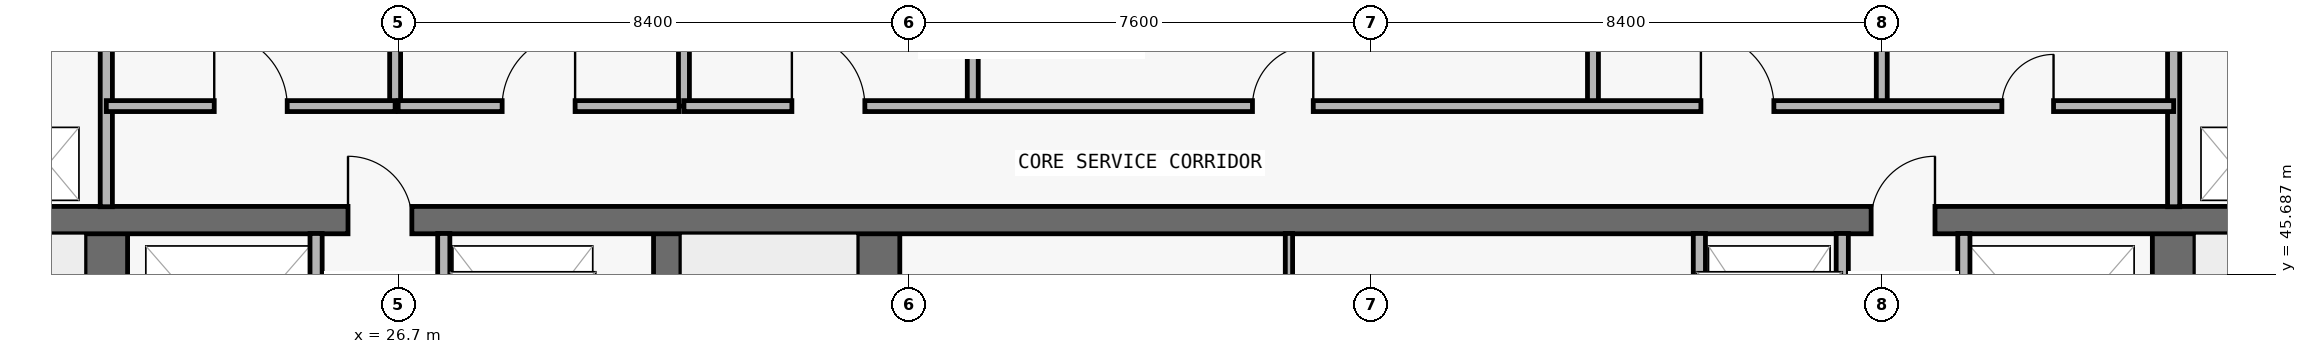
"""IFC4 building model, lengths in metres.
Left out: names, types, materials, properties, quantities, classifications, styles, units other than length and angle.
Written with IfcOpenShell. Run it as: python <this file> out.ifc"""

import sys

from ifc_helpers import new_model, si_unit, direction, frame, frame_2d, origin, place, context, subcontext, project, spatial, rectangle, extrude, element, fill, save


model = new_model("IFC4")
c1 = context("Model", 3, precision=1e-05, world=origin(), true_north=direction((0.0, 1.0)))
c2 = subcontext(c1, "Body", "Model", "MODEL_VIEW")
j1 = project(units=[si_unit("LENGTHUNIT", "METRE"), si_unit("PLANEANGLEUNIT", "RADIAN")], contexts=[c1])
p1 = place(None, origin())
s1 = spatial("IfcSite", under=j1, at=p1, CompositionType="ELEMENT")
p2 = place(p1, origin())
s2 = spatial("IfcBuilding", under=s1, at=p2, CompositionType="ELEMENT")
p3 = place(p2, frame((0.0, 0.0, 233.1)))
s3 = spatial("IfcBuildingStorey", under=s2, at=p3, CompositionType="ELEMENT", Elevation=233.1)
p4 = place(p3, frame((21.9, 37.0, 0.0), z_axis=(0.0, 0.0, 1.0), x_axis=(0.0, 1.0, 0.0)))
e1 = element("IfcWall", 1, at=p4, inside=s3, PredefinedType="SHEAR", context=c2, shape_type="SweptSolid", body=[
    extrude(rectangle(XDim=9.575, YDim=0.7, at=frame_2d((4.788, 0.0))), origin(), (0.0, 0.0, 1.0), 3.05),
])
p5 = place(p4, frame((0.55, 0.0, 0.0)))
e2 = element("IfcOpeningElement", 2, at=p5, cuts=e1, PredefinedType="OPENING", context=c2, shape_type="SweptSolid", body=[
    extrude(rectangle(XDim=1.1, YDim=2.15, at=frame_2d((0.55, 1.075))), frame((0.0, 0.36, 0.0), z_axis=(0.0, -1.0, 0.0), x_axis=(1.0, 0.0, 0.0)), (0.0, 0.0, 1.0), 0.72),
])
p6 = place(p3, frame((55.9, 37.0, 0.0), z_axis=(0.0, 0.0, 1.0), x_axis=(0.0, 1.0, 0.0)))
e3 = element("IfcWall", 3, at=p6, inside=s3, PredefinedType="SHEAR", context=c2, shape_type="SweptSolid", body=[
    extrude(rectangle(XDim=9.575, YDim=0.7, at=frame_2d((4.788, 0.0))), origin(), (0.0, 0.0, 1.0), 3.05),
])
p7 = place(p6, frame((0.55, 0.0, 0.0)))
e4 = element("IfcOpeningElement", 4, at=p7, cuts=e3, PredefinedType="OPENING", context=c2, shape_type="SweptSolid", body=[
    extrude(rectangle(XDim=1.1, YDim=2.15, at=frame_2d((0.55, 1.075))), frame((0.0, 0.36, 0.0), z_axis=(0.0, -1.0, 0.0), x_axis=(1.0, 0.0, 0.0)), (0.0, 0.0, 1.0), 0.72),
])
p8 = place(p3, frame((31.125, 37.0, 0.0), z_axis=(0.0, 0.0, 1.0), x_axis=(0.0, 1.0, 0.0)))
e5 = element("IfcWall", 5, at=p8, inside=s3, PredefinedType="SHEAR", context=c2, shape_type="SweptSolid", body=[
    extrude(rectangle(XDim=9.575, YDim=0.45, at=frame_2d((4.788, 0.0))), origin(), (0.0, 0.0, 1.0), 3.05),
])
p9 = place(p3, frame((34.6, 37.0, 0.0), z_axis=(0.0, 0.0, 1.0), x_axis=(0.0, 1.0, 0.0)))
e6 = element("IfcWall", 6, at=p9, inside=s3, PredefinedType="SHEAR", context=c2, shape_type="SweptSolid", body=[
    extrude(rectangle(XDim=9.575, YDim=0.7, at=frame_2d((4.788, 0.0))), origin(), (0.0, 0.0, 1.0), 3.05),
])
p10 = place(p3, frame((18.3, 46.575, 0.0), z_axis=(0.0, 0.0, 1.0), x_axis=(1.0, 0.0, 0.0)))
e7 = element("IfcWall", 7, at=p10, inside=s3, PredefinedType="SHEAR", context=c2, shape_type="SweptSolid", body=[
    extrude(rectangle(XDim=41.2, YDim=0.45, at=frame_2d((20.6, 0.0))), origin(), (0.0, 0.0, 1.0), 3.05),
])
p11 = place(p10, frame((7.575, 0.0, 0.0)))
e8 = element("IfcOpeningElement", 8, at=p11, cuts=e7, PredefinedType="OPENING", context=c2, shape_type="SweptSolid", body=[
    extrude(rectangle(XDim=1.05, YDim=2.15, at=frame_2d((0.525, 1.075))), frame((0.0, 0.235, 0.0), z_axis=(0.0, -1.0, 0.0), x_axis=(1.0, 0.0, 0.0)), (0.0, 0.0, 1.0), 0.47),
])
p12 = place(p10, frame((32.625, 0.0, 0.0)))
e9 = element("IfcOpeningElement", 9, at=p12, cuts=e7, PredefinedType="OPENING", context=c2, shape_type="SweptSolid", body=[
    extrude(rectangle(XDim=1.05, YDim=2.15, at=frame_2d((0.525, 1.075))), frame((0.0, 0.235, 0.0), z_axis=(0.0, -1.0, 0.0), x_axis=(1.0, 0.0, 0.0)), (0.0, 0.0, 1.0), 0.47),
])
p13 = place(p3, frame((21.9, 46.795, 0.0), z_axis=(0.0, 0.0, 1.0), x_axis=(0.0, 1.0, 0.0)))
e10 = element("IfcWall", 10, at=p13, inside=s3, PredefinedType="PARTITIONING", context=c2, shape_type="SweptSolid", body=[
    extrude(rectangle(XDim=3.16, YDim=0.2, at=frame_2d((1.58, 0.0))), origin(), (0.0, 0.0, 1.0), 3.05),
])
p14 = place(p3, frame((25.35, 43.17, 0.0), z_axis=(0.0, 0.0, 1.0), x_axis=(0.0, 1.0, 0.0)))
e11 = element("IfcWall", 11, at=p14, inside=s3, PredefinedType="PARTITIONING", context=c2, shape_type="SweptSolid", body=[
    extrude(rectangle(XDim=3.185, YDim=0.2, at=frame_2d((1.593, 0.0))), origin(), (0.0, 0.0, 1.0), 3.05),
])
p15 = place(p3, frame((26.65, 48.45, 0.0), z_axis=(0.0, 0.0, 1.0), x_axis=(0.0, 1.0, 0.0)))
e12 = element("IfcWall", 12, at=p15, inside=s3, PredefinedType="PARTITIONING", context=c2, shape_type="SweptSolid", body=[
    extrude(rectangle(XDim=1.505, YDim=0.18, at=frame_2d((0.752, 0.0))), origin(), (0.0, 0.0, 1.0), 3.05),
])
p16 = place(p3, frame((27.45, 43.17, 0.0), z_axis=(0.0, 0.0, 1.0), x_axis=(0.0, 1.0, 0.0)))
e13 = element("IfcWall", 13, at=p16, inside=s3, PredefinedType="PARTITIONING", context=c2, shape_type="SweptSolid", body=[
    extrude(rectangle(XDim=3.185, YDim=0.2, at=frame_2d((1.593, 0.0))), origin(), (0.0, 0.0, 1.0), 3.05),
])
for number, where, z_axis, x_axis in (
    (14, (31.4, 48.45, 0.0), (0.0, 0.0, 1.0), (0.0, 1.0, 0.0)),
    (15, (36.15, 48.45, 0.0), (0.0, 0.0, 1.0), (0.0, 1.0, 0.0)),
):
    element("IfcWall", number, at=place(p3, frame(where, z_axis=z_axis, x_axis=x_axis)), inside=s3, PredefinedType="PARTITIONING", context=c2, shape_type="SweptSolid", body=[
        extrude(rectangle(XDim=1.505, YDim=0.18, at=frame_2d((0.752, 0.0))), origin(), (0.0, 0.0, 1.0), 3.05),
    ])
p17 = place(p3, frame((41.35, 43.17, 0.0), z_axis=(0.0, 0.0, 1.0), x_axis=(0.0, 1.0, 0.0)))
e16 = element("IfcWall", 16, at=p17, inside=s3, PredefinedType="PARTITIONING", context=c2, shape_type="SweptSolid", body=[
    extrude(rectangle(XDim=3.185, YDim=0.12, at=frame_2d((1.593, 0.0))), origin(), (0.0, 0.0, 1.0), 3.05),
])
p18 = place(p3, frame((46.35, 48.45, 0.0), z_axis=(0.0, 0.0, 1.0), x_axis=(0.0, 1.0, 0.0)))
e17 = element("IfcWall", 17, at=p18, inside=s3, PredefinedType="PARTITIONING", context=c2, shape_type="SweptSolid", body=[
    extrude(rectangle(XDim=1.505, YDim=0.18, at=frame_2d((0.752, 0.0))), origin(), (0.0, 0.0, 1.0), 3.05),
])
for number, where, z_axis, x_axis in (
    (18, (48.1, 43.17, 0.0), (0.0, 0.0, 1.0), (0.0, 1.0, 0.0)),
    (19, (50.45, 43.17, 0.0), (0.0, 0.0, 1.0), (0.0, 1.0, 0.0)),
):
    element("IfcWall", number, at=place(p3, frame(where, z_axis=z_axis, x_axis=x_axis)), inside=s3, PredefinedType="PARTITIONING", context=c2, shape_type="SweptSolid", body=[
        extrude(rectangle(XDim=3.185, YDim=0.2, at=frame_2d((1.593, 0.0))), origin(), (0.0, 0.0, 1.0), 3.05),
    ])
p19 = place(p3, frame((51.1, 48.45, 0.0), z_axis=(0.0, 0.0, 1.0), x_axis=(0.0, 1.0, 0.0)))
e20 = element("IfcWall", 20, at=p19, inside=s3, PredefinedType="PARTITIONING", context=c2, shape_type="SweptSolid", body=[
    extrude(rectangle(XDim=1.505, YDim=0.18, at=frame_2d((0.752, 0.0))), origin(), (0.0, 0.0, 1.0), 3.05),
])
p20 = place(p3, frame((52.45, 43.17, 0.0), z_axis=(0.0, 0.0, 1.0), x_axis=(0.0, 1.0, 0.0)))
e21 = element("IfcWall", 21, at=p20, inside=s3, PredefinedType="PARTITIONING", context=c2, shape_type="SweptSolid", body=[
    extrude(rectangle(XDim=3.185, YDim=0.2, at=frame_2d((1.593, 0.0))), origin(), (0.0, 0.0, 1.0), 3.05),
])
p21 = place(p3, frame((55.9, 46.795, 0.0), z_axis=(0.0, 0.0, 1.0), x_axis=(0.0, 1.0, 0.0)))
e22 = element("IfcWall", 22, at=p21, inside=s3, PredefinedType="PARTITIONING", context=c2, shape_type="SweptSolid", body=[
    extrude(rectangle(XDim=3.16, YDim=0.2, at=frame_2d((1.58, 0.0))), origin(), (0.0, 0.0, 1.0), 3.05),
])
p22 = place(p3, frame((21.9, 48.45, 0.0), z_axis=(0.0, 0.0, 1.0), x_axis=(1.0, 0.0, 0.0)))
e23 = element("IfcWall", 23, at=p22, inside=s3, PredefinedType="PARTITIONING", context=c2, shape_type="SweptSolid", body=[
    extrude(rectangle(XDim=4.75, YDim=0.18, at=frame_2d((2.375, 0.0))), origin(), (0.0, 0.0, 1.0), 3.05),
])
p23 = place(p22, frame((1.775, 0.0, 0.0)))
e24 = element("IfcOpeningElement", 24, at=p23, cuts=e23, PredefinedType="OPENING", context=c2, shape_type="SweptSolid", body=[
    extrude(rectangle(XDim=1.2, YDim=2.2, at=frame_2d((0.6, 1.1))), frame((0.0, 0.1, 0.0), z_axis=(0.0, -1.0, 0.0), x_axis=(1.0, 0.0, 0.0)), (0.0, 0.0, 1.0), 0.2),
])
p24 = place(p3, frame((26.7, 48.45, 0.0), z_axis=(0.0, 0.0, 1.0), x_axis=(1.0, 0.0, 0.0)))
e25 = element("IfcWall", 25, at=p24, inside=s3, PredefinedType="PARTITIONING", context=c2, shape_type="SweptSolid", body=[
    extrude(rectangle(XDim=4.62, YDim=0.18, at=frame_2d((2.31, 0.0))), origin(), (0.0, 0.0, 1.0), 3.05),
])
p25 = place(p24, frame((1.71, 0.0, 0.0)))
e26 = element("IfcOpeningElement", 26, at=p25, cuts=e25, PredefinedType="OPENING", context=c2, shape_type="SweptSolid", body=[
    extrude(rectangle(XDim=1.2, YDim=2.2, at=frame_2d((0.6, 1.1))), frame((0.0, 0.1, 0.0), z_axis=(0.0, -1.0, 0.0), x_axis=(1.0, 0.0, 0.0)), (0.0, 0.0, 1.0), 0.2),
])
p26 = place(p3, frame((31.4, 48.45, 0.0), z_axis=(0.0, 0.0, 1.0), x_axis=(1.0, 0.0, 0.0)))
e27 = element("IfcWall", 27, at=p26, inside=s3, PredefinedType="PARTITIONING", context=c2, shape_type="SweptSolid", body=[
    extrude(rectangle(XDim=24.5, YDim=0.18, at=frame_2d((12.25, 0.0))), origin(), (0.0, 0.0, 1.0), 3.05),
])
p27 = place(p26, frame((1.775, 0.0, 0.0)))
e28 = element("IfcOpeningElement", 28, at=p27, cuts=e27, PredefinedType="OPENING", context=c2, shape_type="SweptSolid", body=[
    extrude(rectangle(XDim=1.2, YDim=2.2, at=frame_2d((0.6, 1.1))), frame((0.0, 0.1, 0.0), z_axis=(0.0, -1.0, 0.0), x_axis=(1.0, 0.0, 0.0)), (0.0, 0.0, 1.0), 0.2),
])
p28 = place(p26, frame((9.35, 0.0, 0.0)))
e29 = element("IfcOpeningElement", 29, at=p28, cuts=e27, PredefinedType="OPENING", context=c2, shape_type="SweptSolid", body=[
    extrude(rectangle(XDim=1.0, YDim=2.2, at=frame_2d((0.5, 1.1))), frame((0.0, 0.1, 0.0), z_axis=(0.0, -1.0, 0.0), x_axis=(1.0, 0.0, 0.0)), (0.0, 0.0, 1.0), 0.2),
])
p29 = place(p26, frame((16.725, 0.0, 0.0)))
e30 = element("IfcOpeningElement", 30, at=p29, cuts=e27, PredefinedType="OPENING", context=c2, shape_type="SweptSolid", body=[
    extrude(rectangle(XDim=1.2, YDim=2.2, at=frame_2d((0.6, 1.1))), frame((0.0, 0.1, 0.0), z_axis=(0.0, -1.0, 0.0), x_axis=(1.0, 0.0, 0.0)), (0.0, 0.0, 1.0), 0.2),
])
p30 = place(p26, frame((21.675, 0.0, 0.0)))
e31 = element("IfcOpeningElement", 31, at=p30, cuts=e27, PredefinedType="OPENING", context=c2, shape_type="SweptSolid", body=[
    extrude(rectangle(XDim=0.85, YDim=2.1, at=frame_2d((0.425, 1.05))), frame((0.0, 0.1, 0.0), z_axis=(0.0, -1.0, 0.0), x_axis=(1.0, 0.0, 0.0)), (0.0, 0.0, 1.0), 0.2),
])
p31 = place(p11, origin())
e32 = element("IfcDoor", 32, at=p31, inside=s3, OperationType="SINGLE_SWING_LEFT", PredefinedType="DOOR", context=c2, shape_type="SweptSolid", body=[
    extrude(rectangle(XDim=1.05, YDim=2.15, at=frame_2d((0.525, 1.075))), frame((0.0, 0.025, 0.0), z_axis=(0.0, -1.0, 0.0), x_axis=(1.0, 0.0, 0.0)), (0.0, 0.0, 1.0), 0.05),
])
fill(e8, e32)
p32 = place(p12, origin())
e33 = element("IfcDoor", 33, at=p32, inside=s3, OperationType="SINGLE_SWING_RIGHT", PredefinedType="DOOR", context=c2, shape_type="SweptSolid", body=[
    extrude(rectangle(XDim=1.05, YDim=2.15, at=frame_2d((0.525, 1.075))), frame((0.0, 0.025, 0.0), z_axis=(0.0, -1.0, 0.0), x_axis=(1.0, 0.0, 0.0)), (0.0, 0.0, 1.0), 0.05),
])
fill(e9, e33)
p33 = place(p23, origin())
e34 = element("IfcDoor", 34, at=p33, inside=s3, OperationType="SINGLE_SWING_LEFT", PredefinedType="DOOR", context=c2, shape_type="SweptSolid", body=[
    extrude(rectangle(XDim=1.2, YDim=2.2, at=frame_2d((0.6, 1.1))), frame((0.0, 0.025, 0.0), z_axis=(0.0, -1.0, 0.0), x_axis=(1.0, 0.0, 0.0)), (0.0, 0.0, 1.0), 0.05),
])
fill(e24, e34)
p34 = place(p25, origin())
e35 = element("IfcDoor", 35, at=p34, inside=s3, OperationType="SINGLE_SWING_RIGHT", PredefinedType="DOOR", context=c2, shape_type="SweptSolid", body=[
    extrude(rectangle(XDim=1.2, YDim=2.2, at=frame_2d((0.6, 1.1))), frame((0.0, 0.025, 0.0), z_axis=(0.0, -1.0, 0.0), x_axis=(1.0, 0.0, 0.0)), (0.0, 0.0, 1.0), 0.05),
])
fill(e26, e35)
p35 = place(p27, origin())
e36 = element("IfcDoor", 36, at=p35, inside=s3, OperationType="SINGLE_SWING_LEFT", PredefinedType="DOOR", context=c2, shape_type="SweptSolid", body=[
    extrude(rectangle(XDim=1.2, YDim=2.2, at=frame_2d((0.6, 1.1))), frame((0.0, 0.025, 0.0), z_axis=(0.0, -1.0, 0.0), x_axis=(1.0, 0.0, 0.0)), (0.0, 0.0, 1.0), 0.05),
])
fill(e28, e36)
p36 = place(p28, origin())
e37 = element("IfcDoor", 37, at=p36, inside=s3, OperationType="SINGLE_SWING_RIGHT", PredefinedType="DOOR", context=c2, shape_type="SweptSolid", body=[
    extrude(rectangle(XDim=1.0, YDim=2.2, at=frame_2d((0.5, 1.1))), frame((0.0, 0.025, 0.0), z_axis=(0.0, -1.0, 0.0), x_axis=(1.0, 0.0, 0.0)), (0.0, 0.0, 1.0), 0.05),
])
fill(e29, e37)
p37 = place(p29, origin())
e38 = element("IfcDoor", 38, at=p37, inside=s3, OperationType="SINGLE_SWING_LEFT", PredefinedType="DOOR", context=c2, shape_type="SweptSolid", body=[
    extrude(rectangle(XDim=1.2, YDim=2.2, at=frame_2d((0.6, 1.1))), frame((0.0, 0.025, 0.0), z_axis=(0.0, -1.0, 0.0), x_axis=(1.0, 0.0, 0.0)), (0.0, 0.0, 1.0), 0.05),
])
fill(e30, e38)
p38 = place(p30, origin())
e39 = element("IfcDoor", 39, at=p38, inside=s3, OperationType="SINGLE_SWING_RIGHT", PredefinedType="DOOR", context=c2, shape_type="SweptSolid", body=[
    extrude(rectangle(XDim=0.85, YDim=2.1, at=frame_2d((0.425, 1.05))), frame((0.0, 0.025, 0.0), z_axis=(0.0, -1.0, 0.0), x_axis=(1.0, 0.0, 0.0)), (0.0, 0.0, 1.0), 0.05),
])
fill(e31, e39)
save(model, sys.argv[1])
